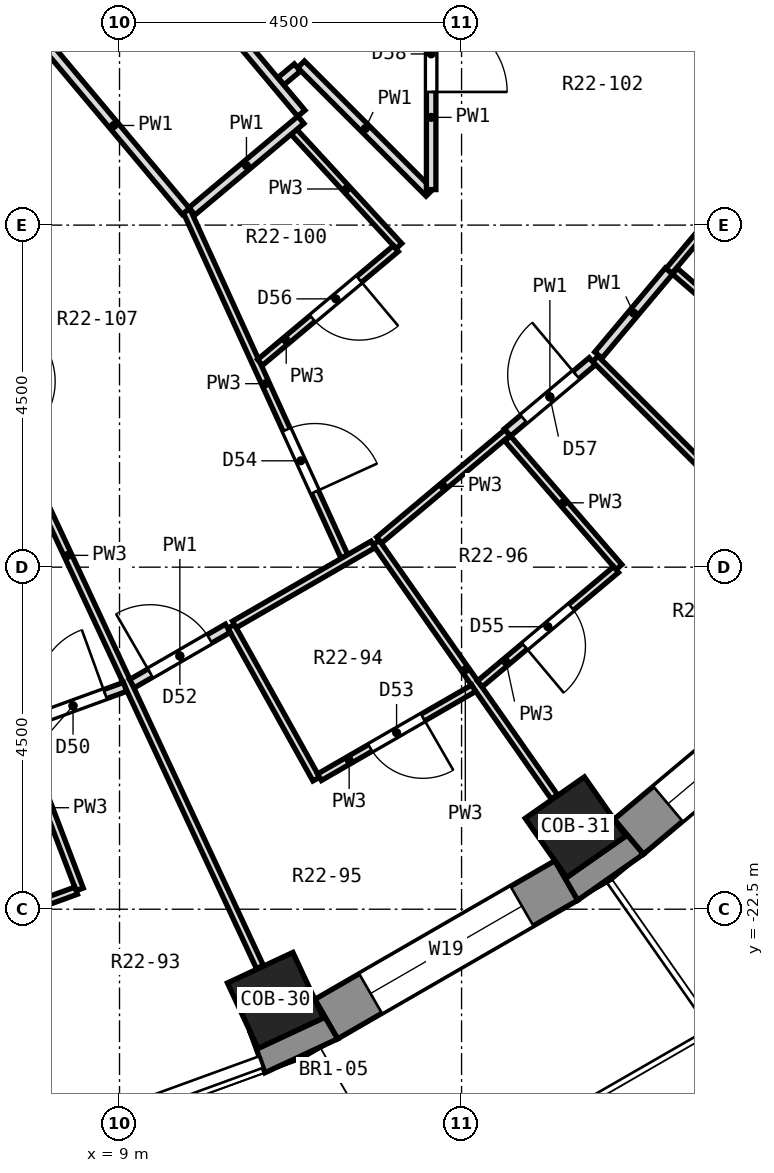
"""IFC4 building model, lengths in metres.
Left out: names, types, materials, properties, quantities, classifications, styles, units other than length and angle.
Written with IfcOpenShell. Run it as: python <this file> out.ifc"""

import sys

from ifc_helpers import new_model, si_unit, direction, frame, frame_2d, origin, origin_2d, place, context, subcontext, project, spatial, polyline, rectangle, outline, extrude, element, fill, save


model = new_model("IFC4")
c1 = context("Model", 3, precision=1e-05, world=origin(), true_north=direction((0.0, 1.0)))
c2 = subcontext(c1, "Body", "Model", "MODEL_VIEW")
j1 = project(units=[si_unit("LENGTHUNIT", "METRE"), si_unit("PLANEANGLEUNIT", "RADIAN")], contexts=[c1])
p1 = place(None, origin())
s1 = spatial("IfcSite", under=j1, at=p1, CompositionType="ELEMENT")
p2 = place(p1, origin())
s2 = spatial("IfcBuilding", under=s1, at=p2, CompositionType="ELEMENT")
p3 = place(p2, frame((0.0, 0.0, 141.4)))
s3 = spatial("IfcBuildingStorey", under=s2, at=p3, CompositionType="ELEMENT", Elevation=141.4)
for number, where, z_axis, x_axis in (
    (1, (11.052, -23.7, 0.0), (0.0, 0.0, 1.0), (0.423, -0.906, 0.0)),
    (2, (14.999, -21.421, 0.0), (0.0, 0.0, 1.0), (0.574, -0.819, 0.0)),
):
    element("IfcColumn", number, at=place(p3, frame(where, z_axis=z_axis, x_axis=x_axis)), inside=s3, PredefinedType="COLUMN", context=c2, shape_type="SweptSolid", body=[
        extrude(rectangle(XDim=0.95, YDim=0.95, at=origin_2d()), origin(), (0.0, 0.0, 1.0), 3.3),
    ])
p4 = place(p3, frame((11.719, -23.946, 0.0), z_axis=(0.0, 0.0, 1.0), x_axis=(0.866051847062, 0.499954196102, 0.0)))
e3 = element("IfcWall", 3, at=p4, inside=s3, PredefinedType="SOLIDWALL", context=c2, shape_type="SweptSolid", body=[
    extrude(rectangle(XDim=3.648, YDim=0.6, at=frame_2d((1.824, 0.0))), origin(), (0.0, 0.0, 1.0), 2.8),
])
p5 = place(p4, frame((0.674, 0.0, 0.9)))
e4 = element("IfcOpeningElement", 4, at=p5, cuts=e3, PredefinedType="OPENING", context=c2, shape_type="SweptSolid", body=[
    extrude(rectangle(XDim=2.3, YDim=1.8, at=frame_2d((1.15, 0.9))), frame((0.0, 0.312, 0.0), z_axis=(0.0, -1.0, 0.0), x_axis=(1.0, 0.0, 0.0)), (0.0, 0.0, 1.0), 0.624),
])
p6 = place(p3, frame((15.699, -21.547, 0.0), z_axis=(0.0, 0.0, 1.0), x_axis=(0.766055462616, 0.642774476932, 0.0)))
e5 = element("IfcWall", 5, at=p6, inside=s3, PredefinedType="SOLIDWALL", context=c2, shape_type="SweptSolid", body=[
    extrude(rectangle(XDim=3.648, YDim=0.6, at=frame_2d((1.824, 0.0))), origin(), (0.0, 0.0, 1.0), 2.8),
])
p7 = place(p6, frame((0.674, 0.0, 0.9)))
e6 = element("IfcOpeningElement", 6, at=p7, cuts=e5, PredefinedType="OPENING", context=c2, shape_type="SweptSolid", body=[
    extrude(rectangle(XDim=2.3, YDim=1.8, at=frame_2d((1.15, 0.9))), frame((0.0, 0.312, 0.0), z_axis=(0.0, -1.0, 0.0), x_axis=(1.0, 0.0, 0.0)), (0.0, 0.0, 1.0), 0.624),
])
p8 = place(p3, origin())
e7 = element("IfcWall", 7, at=p8, inside=s3, PredefinedType="SOLIDWALL", context=c2, shape_type="SweptSolid", body=[
    extrude(outline(polyline([(10.913, -24.651), (11.869, -24.206), (11.569, -23.686), (11.683, -23.93), (10.822, -24.331), (10.708, -24.087), (10.913, -24.651)])), origin(), (0.0, 0.0, 1.0), 2.8),
])
p9 = place(p3, origin())
e8 = element("IfcWall", 8, at=p9, inside=s3, PredefinedType="SOLIDWALL", context=c2, shape_type="SweptSolid", body=[
    extrude(outline(polyline([(15.892, -21.777), (15.506, -21.317), (15.661, -21.538), (14.882, -22.083), (14.728, -21.862), (15.028, -22.382), (15.892, -21.777)])), origin(), (0.0, 0.0, 1.0), 2.8),
])
p10 = place(p3, frame((7.657, -20.09, 0.0), z_axis=(0.0, 0.0, 1.0), x_axis=(0.35616749028, -0.934422130981, 0.0)))
e9 = element("IfcWall", 9, at=p10, inside=s3, PredefinedType="PARTITIONING", context=c2, shape_type="SweptSolid", body=[
    extrude(rectangle(XDim=2.3, YDim=0.1, at=frame_2d((1.15, 0.0))), origin(), (0.0, 0.0, 1.0), 2.8),
])
p11 = place(p3, frame((9.883, -13.312, 0.0), z_axis=(0.0, 0.0, 1.0), x_axis=(0.415273903312, -0.909696424764, 0.0)))
e10 = element("IfcWall", 10, at=p11, inside=s3, PredefinedType="PARTITIONING", context=c2, shape_type="SweptSolid", body=[
    extrude(rectangle(XDim=5.0, YDim=0.1, at=frame_2d((2.5, 0.0))), origin(), (0.0, 0.0, 1.0), 2.8),
])
p12 = place(p11, frame((3.166, 0.0, 0.0)))
e11 = element("IfcOpeningElement", 11, at=p12, cuts=e10, PredefinedType="OPENING", context=c2, shape_type="SweptSolid", body=[
    extrude(rectangle(XDim=0.9, YDim=2.1, at=frame_2d((0.45, 1.05))), frame((0.0, 0.062, 0.0), z_axis=(0.0, -1.0, 0.0), x_axis=(1.0, 0.0, 0.0)), (0.0, 0.0, 1.0), 0.124),
])
p13 = place(p3, frame((5.794, -12.43, 0.0), z_axis=(0.0, 0.0, 1.0), x_axis=(0.422795993745, -0.906224888023, 0.0)))
e12 = element("IfcWall", 12, at=p13, inside=s3, PredefinedType="PARTITIONING", context=c2, shape_type="SweptSolid", body=[
    extrude(rectangle(XDim=11.951, YDim=0.1, at=frame_2d((5.975, 0.0))), origin(), (0.0, 0.0, 1.0), 2.8),
])
p14 = place(p13, frame((3.451, 0.0, 0.0)))
e13 = element("IfcOpeningElement", 13, at=p14, cuts=e12, PredefinedType="OPENING", context=c2, shape_type="SweptSolid", body=[
    extrude(rectangle(XDim=0.9, YDim=2.1, at=frame_2d((0.45, 1.05))), frame((0.0, 0.062, 0.0), z_axis=(0.0, -1.0, 0.0), x_axis=(1.0, 0.0, 0.0)), (0.0, 0.0, 1.0), 0.124),
])
p15 = place(p3, frame((10.468, -18.779, 0.0), z_axis=(0.0, 0.0, 1.0), x_axis=(0.486886136125, -0.873465448915, 0.0)))
e14 = element("IfcWall", 14, at=p15, inside=s3, PredefinedType="PARTITIONING", context=c2, shape_type="SweptSolid", body=[
    extrude(rectangle(XDim=2.3, YDim=0.1, at=frame_2d((1.15, 0.0))), origin(), (0.0, 0.0, 1.0), 2.8),
])
p16 = place(p3, frame((12.377, -17.677, 0.0), z_axis=(0.0, 0.0, 1.0), x_axis=(0.573843281236, -0.818965132702, 0.0)))
e15 = element("IfcWall", 15, at=p16, inside=s3, PredefinedType="PARTITIONING", context=c2, shape_type="SweptSolid", body=[
    extrude(rectangle(XDim=4.086, YDim=0.1, at=frame_2d((2.043, 0.0))), origin(), (0.0, 0.0, 1.0), 2.8),
])
p17 = place(p3, frame((7.977, -11.059, 0.0), z_axis=(0.0, 0.0, 1.0), x_axis=(0.642679638204, -0.766135028985, 0.0)))
e16 = element("IfcWall", 16, at=p17, inside=s3, PredefinedType="PARTITIONING", context=c2, shape_type="SweptSolid", body=[
    extrude(rectangle(XDim=2.95, YDim=0.125, at=frame_2d((1.475, 0.0))), origin(), (0.0, 0.0, 1.0), 2.8),
])
p18 = place(p3, frame((8.22, -8.247, 0.0), z_axis=(0.0, 0.0, 1.0), x_axis=(0.642555132876, -0.766239454228, 0.0)))
e17 = element("IfcWall", 17, at=p18, inside=s3, PredefinedType="PARTITIONING", context=c2, shape_type="SweptSolid", body=[
    extrude(rectangle(XDim=4.937, YDim=0.125, at=frame_2d((2.468, 0.0))), origin(), (0.0, 0.0, 1.0), 2.8),
])
p19 = place(p3, frame((14.107, -16.307, 0.0), z_axis=(0.0, 0.0, 1.0), x_axis=(0.654423540777, -0.756128183099, 0.0)))
e18 = element("IfcWall", 18, at=p19, inside=s3, PredefinedType="PARTITIONING", context=c2, shape_type="SweptSolid", body=[
    extrude(rectangle(XDim=2.237, YDim=0.1, at=frame_2d((1.119, 0.0))), origin(), (0.0, 0.0, 1.0), 2.8),
])
p20 = place(p3, frame((11.295, -12.274, 0.0), z_axis=(0.0, 0.0, 1.0), x_axis=(0.676981317167, -0.736000201228, 0.0)))
e19 = element("IfcWall", 19, at=p20, inside=s3, PredefinedType="PARTITIONING", context=c2, shape_type="SweptSolid", body=[
    extrude(rectangle(XDim=2.039, YDim=0.1, at=frame_2d((1.02, 0.0))), origin(), (0.0, 0.0, 1.0), 2.8),
])
p21 = place(p3, frame((15.259, -15.259, 0.0), z_axis=(0.0, 0.0, 1.0), x_axis=(0.707106781187, -0.707106781187, 0.0)))
e20 = element("IfcWall", 20, at=p21, inside=s3, PredefinedType="PARTITIONING", context=c2, shape_type="SweptSolid", body=[
    extrude(rectangle(XDim=4.085, YDim=0.1, at=frame_2d((2.043, 0.0))), origin(), (0.0, 0.0, 1.0), 2.8),
])
p22 = place(p3, frame((11.388, -11.385, 0.0), z_axis=(0.0, 0.0, 1.0), x_axis=(0.707157874563, -0.707055684118, 0.0)))
e21 = element("IfcWall", 21, at=p22, inside=s3, PredefinedType="PARTITIONING", context=c2, shape_type="SweptSolid", body=[
    extrude(rectangle(XDim=2.389, YDim=0.125, at=frame_2d((1.195, 0.0))), origin(), (0.0, 0.0, 1.0), 2.8),
])
p23 = place(p3, frame((16.307, -14.107, 0.0), z_axis=(0.0, 0.0, 1.0), x_axis=(0.756128183099, -0.654423540777, 0.0)))
e22 = element("IfcWall", 22, at=p23, inside=s3, PredefinedType="PARTITIONING", context=c2, shape_type="SweptSolid", body=[
    extrude(rectangle(XDim=2.237, YDim=0.1, at=frame_2d((1.119, 0.0))), origin(), (0.0, 0.0, 1.0), 2.8),
])
p24 = place(p3, frame((6.242, -23.053, 0.0), z_axis=(0.0, 0.0, 1.0), x_axis=(0.939618756308, 0.342223016166, 0.0)))
e23 = element("IfcWall", 23, at=p24, inside=s3, PredefinedType="PARTITIONING", context=c2, shape_type="SweptSolid", body=[
    extrude(rectangle(XDim=2.328, YDim=0.1, at=frame_2d((1.164, 0.0))), origin(), (0.0, 0.0, 1.0), 2.8),
])
p25 = place(p24, frame((0.758, 0.0, 0.0)))
e24 = element("IfcOpeningElement", 24, at=p25, cuts=e23, PredefinedType="OPENING", context=c2, shape_type="SweptSolid", body=[
    extrude(rectangle(XDim=0.8, YDim=2.1, at=frame_2d((0.4, 1.05))), frame((0.0, 0.062, 0.0), z_axis=(0.0, -1.0, 0.0), x_axis=(1.0, 0.0, 0.0)), (0.0, 0.0, 1.0), 0.124),
])
p26 = place(p3, frame((7.704, -20.073, 0.0), z_axis=(0.0, 0.0, 1.0), x_axis=(0.939788529673, 0.341756520778, 0.0)))
e25 = element("IfcWall", 25, at=p26, inside=s3, PredefinedType="PARTITIONING", context=c2, shape_type="SweptSolid", body=[
    extrude(rectangle(XDim=1.457, YDim=0.125, at=frame_2d((0.728, 0.0))), origin(), (0.0, 0.0, 1.0), 2.8),
])
p27 = place(p26, frame((0.278, 0.0, 0.0)))
e26 = element("IfcOpeningElement", 26, at=p27, cuts=e25, PredefinedType="OPENING", context=c2, shape_type="SweptSolid", body=[
    extrude(rectangle(XDim=0.9, YDim=2.1, at=frame_2d((0.45, 1.05))), frame((0.0, 0.074, 0.0), z_axis=(0.0, -1.0, 0.0), x_axis=(1.0, 0.0, 0.0)), (0.0, 0.0, 1.0), 0.149),
])
p28 = place(p3, frame((11.631, -20.763, 0.0), z_axis=(0.0, 0.0, 1.0), x_axis=(0.866130014302, 0.499818765479, 0.0)))
e27 = element("IfcWall", 27, at=p28, inside=s3, PredefinedType="PARTITIONING", context=c2, shape_type="SweptSolid", body=[
    extrude(rectangle(XDim=2.341, YDim=0.1, at=frame_2d((1.17, 0.0))), origin(), (0.0, 0.0, 1.0), 2.8),
])
p29 = place(p28, frame((0.771, 0.0, 0.0)))
e28 = element("IfcOpeningElement", 28, at=p29, cuts=e27, PredefinedType="OPENING", context=c2, shape_type="SweptSolid", body=[
    extrude(rectangle(XDim=0.8, YDim=2.1, at=frame_2d((0.4, 1.05))), frame((0.0, 0.062, 0.0), z_axis=(0.0, -1.0, 0.0), x_axis=(1.0, 0.0, 0.0)), (0.0, 0.0, 1.0), 0.124),
])
p30 = place(p3, frame((10.511, -18.754, 0.0), z_axis=(0.0, 0.0, 1.0), x_axis=(0.866071606143, 0.499919966627, 0.0)))
e29 = element("IfcWall", 29, at=p30, inside=s3, PredefinedType="PARTITIONING", context=c2, shape_type="SweptSolid", body=[
    extrude(rectangle(XDim=2.104, YDim=0.1, at=frame_2d((1.052, 0.0))), origin(), (0.0, 0.0, 1.0), 2.8),
])
p31 = place(p3, frame((9.163, -19.533, 0.0), z_axis=(0.0, 0.0, 1.0), x_axis=(0.865819905352, 0.500355764928, 0.0)))
e30 = element("IfcWall", 30, at=p31, inside=s3, PredefinedType="PARTITIONING", context=c2, shape_type="SweptSolid", body=[
    extrude(rectangle(XDim=1.457, YDim=0.125, at=frame_2d((0.729, 0.0))), origin(), (0.0, 0.0, 1.0), 2.8),
])
p32 = place(p31, frame((0.279, 0.0, 0.0)))
e31 = element("IfcOpeningElement", 31, at=p32, cuts=e30, PredefinedType="OPENING", context=c2, shape_type="SweptSolid", body=[
    extrude(rectangle(XDim=0.9, YDim=2.1, at=frame_2d((0.45, 1.05))), frame((0.0, 0.074, 0.0), z_axis=(0.0, -1.0, 0.0), x_axis=(1.0, 0.0, 0.0)), (0.0, 0.0, 1.0), 0.149),
])
p33 = place(p3, frame((11.125, -11.606, 0.0), z_axis=(0.0, 0.0, 1.0), x_axis=(0.766857755144, 0.641817094955, 0.0)))
e32 = element("IfcWall", 32, at=p33, inside=s3, PredefinedType="PARTITIONING", context=c2, shape_type="SweptSolid", body=[
    extrude(rectangle(XDim=0.279, YDim=0.125, at=frame_2d((0.14, 0.0))), origin(), (0.0, 0.0, 1.0), 2.8),
])
p34 = place(p3, frame((13.74, -19.536, 0.0), z_axis=(0.0, 0.0, 1.0), x_axis=(0.765924716163, 0.642930267735, 0.0)))
e33 = element("IfcWall", 33, at=p34, inside=s3, PredefinedType="PARTITIONING", context=c2, shape_type="SweptSolid", body=[
    extrude(rectangle(XDim=2.34, YDim=0.1, at=frame_2d((1.17, 0.0))), origin(), (0.0, 0.0, 1.0), 2.8),
])
p35 = place(p34, frame((0.77, 0.0, 0.0)))
e34 = element("IfcOpeningElement", 34, at=p35, cuts=e33, PredefinedType="OPENING", context=c2, shape_type="SweptSolid", body=[
    extrude(rectangle(XDim=0.8, YDim=2.1, at=frame_2d((0.4, 1.05))), frame((0.0, 0.062, 0.0), z_axis=(0.0, -1.0, 0.0), x_axis=(1.0, 0.0, 0.0)), (0.0, 0.0, 1.0), 0.124),
])
p36 = place(p3, frame((12.415, -17.645, 0.0), z_axis=(0.0, 0.0, 1.0), x_axis=(0.766093039246, 0.642729690631, 0.0)))
e35 = element("IfcWall", 35, at=p36, inside=s3, PredefinedType="PARTITIONING", context=c2, shape_type="SweptSolid", body=[
    extrude(rectangle(XDim=2.205, YDim=0.1, at=frame_2d((1.102, 0.0))), origin(), (0.0, 0.0, 1.0), 2.8),
])
p37 = place(p3, frame((14.104, -16.228, 0.0), z_axis=(0.0, 0.0, 1.0), x_axis=(0.766114305984, 0.642704341177, 0.0)))
e36 = element("IfcWall", 36, at=p37, inside=s3, PredefinedType="PARTITIONING", context=c2, shape_type="SweptSolid", body=[
    extrude(rectangle(XDim=1.456, YDim=0.125, at=frame_2d((0.728, 0.0))), origin(), (0.0, 0.0, 1.0), 2.8),
])
p38 = place(p37, frame((0.278, 0.0, 0.0)))
e37 = element("IfcOpeningElement", 37, at=p38, cuts=e36, PredefinedType="OPENING", context=c2, shape_type="SweptSolid", body=[
    extrude(rectangle(XDim=0.9, YDim=2.1, at=frame_2d((0.45, 1.05))), frame((0.0, 0.074, 0.0), z_axis=(0.0, -1.0, 0.0), x_axis=(1.0, 0.0, 0.0)), (0.0, 0.0, 1.0), 0.149),
])
p39 = place(p3, frame((10.848, -15.307, 0.0), z_axis=(0.0, 0.0, 1.0), x_axis=(0.766356114298, 0.642415991456, 0.0)))
e38 = element("IfcWall", 38, at=p39, inside=s3, PredefinedType="PARTITIONING", context=c2, shape_type="SweptSolid", body=[
    extrude(rectangle(XDim=2.332, YDim=0.1, at=frame_2d((1.166, 0.0))), origin(), (0.0, 0.0, 1.0), 2.8),
])
p40 = place(p39, frame((0.902, 0.0, 0.0)))
e39 = element("IfcOpeningElement", 39, at=p40, cuts=e38, PredefinedType="OPENING", context=c2, shape_type="SweptSolid", body=[
    extrude(rectangle(XDim=0.8, YDim=2.1, at=frame_2d((0.4, 1.05))), frame((0.0, 0.062, 0.0), z_axis=(0.0, -1.0, 0.0), x_axis=(1.0, 0.0, 0.0)), (0.0, 0.0, 1.0), 0.124),
])
p41 = place(p3, frame((9.954, -13.317, 0.0), z_axis=(0.0, 0.0, 1.0), x_axis=(0.766162509907, 0.642646876919, 0.0)))
e40 = element("IfcWall", 40, at=p41, inside=s3, PredefinedType="PARTITIONING", context=c2, shape_type="SweptSolid", body=[
    extrude(rectangle(XDim=1.87, YDim=0.125, at=frame_2d((0.935, 0.0))), origin(), (0.0, 0.0, 1.0), 2.8),
])
p42 = place(p3, frame((16.228, -14.104, 0.0), z_axis=(0.0, 0.0, 1.0), x_axis=(0.642710935311, 0.766108774021, 0.0)))
e41 = element("IfcWall", 41, at=p42, inside=s3, PredefinedType="PARTITIONING", context=c2, shape_type="SweptSolid", body=[
    extrude(rectangle(XDim=2.202, YDim=0.1, at=frame_2d((1.101, 0.0))), origin(), (0.0, 0.0, 1.0), 2.8),
])
p43 = place(p3, frame((15.3, -15.21, 0.0), z_axis=(0.0, 0.0, 1.0), x_axis=(0.642676314535, 0.766137817064, 0.0)))
e42 = element("IfcWall", 42, at=p43, inside=s3, PredefinedType="PARTITIONING", context=c2, shape_type="SweptSolid", body=[
    extrude(rectangle(XDim=1.444, YDim=0.125, at=frame_2d((0.722, 0.0))), origin(), (0.0, 0.0, 1.0), 2.8),
])
p44 = place(p3, frame((13.1, -13.032, 0.0), z_axis=(0.0, 0.0, 1.0), x_axis=(0.0, 1.0, 0.0)))
e43 = element("IfcWall", 43, at=p44, inside=s3, PredefinedType="PARTITIONING", context=c2, shape_type="SweptSolid", body=[
    extrude(rectangle(XDim=3.632, YDim=0.125, at=frame_2d((1.816, 0.0))), origin(), (0.0, 0.0, 1.0), 2.8),
])
p45 = place(p44, frame((1.284, 0.0, 0.0)))
e44 = element("IfcOpeningElement", 44, at=p45, cuts=e43, PredefinedType="OPENING", context=c2, shape_type="SweptSolid", body=[
    extrude(rectangle(XDim=1.0, YDim=2.1, at=frame_2d((0.5, 1.05))), frame((0.0, 0.074, 0.0), z_axis=(0.0, -1.0, 0.0), x_axis=(1.0, 0.0, 0.0)), (0.0, 0.0, 1.0), 0.149),
])
p46 = place(p44, frame((2.435, 0.0, 0.0)))
e45 = element("IfcOpeningElement", 45, at=p46, cuts=e43, PredefinedType="OPENING", context=c2, shape_type="SweptSolid", body=[
    extrude(rectangle(XDim=0.9, YDim=2.1, at=frame_2d((0.45, 1.05))), frame((0.0, 0.074, 0.0), z_axis=(0.0, -1.0, 0.0), x_axis=(1.0, 0.0, 0.0)), (0.0, 0.0, 1.0), 0.149),
])
p47 = place(p5, origin())
e46 = element("IfcWindow", 46, at=p47, inside=s3, PartitioningType="SINGLE_PANEL", PredefinedType="WINDOW", context=c2, shape_type="SweptSolid", body=[
    extrude(rectangle(XDim=2.3, YDim=1.8, at=frame_2d((1.15, 0.9))), frame((0.0, 0.18, 0.0), z_axis=(0.0, -1.0, 0.0), x_axis=(1.0, 0.0, 0.0)), (0.0, 0.0, 1.0), 0.06),
])
fill(e4, e46)
p48 = place(p7, origin())
e47 = element("IfcWindow", 47, at=p48, inside=s3, PartitioningType="SINGLE_PANEL", PredefinedType="WINDOW", context=c2, shape_type="SweptSolid", body=[
    extrude(rectangle(XDim=2.3, YDim=1.8, at=frame_2d((1.15, 0.9))), frame((0.0, 0.18, 0.0), z_axis=(0.0, -1.0, 0.0), x_axis=(1.0, 0.0, 0.0)), (0.0, 0.0, 1.0), 0.06),
])
fill(e6, e47)
p49 = place(p27, origin())
e48 = element("IfcDoor", 48, at=p49, inside=s3, OperationType="SINGLE_SWING_RIGHT", PredefinedType="DOOR", context=c2, shape_type="SweptSolid", body=[
    extrude(rectangle(XDim=0.9, YDim=2.1, at=frame_2d((0.45, 1.05))), frame((0.0, 0.025, 0.0), z_axis=(0.0, -1.0, 0.0), x_axis=(1.0, 0.0, 0.0)), (0.0, 0.0, 1.0), 0.05),
])
fill(e26, e48)
p50 = place(p32, origin())
e49 = element("IfcDoor", 49, at=p50, inside=s3, OperationType="SINGLE_SWING_LEFT", PredefinedType="DOOR", context=c2, shape_type="SweptSolid", body=[
    extrude(rectangle(XDim=0.9, YDim=2.1, at=frame_2d((0.45, 1.05))), frame((0.0, 0.025, 0.0), z_axis=(0.0, -1.0, 0.0), x_axis=(1.0, 0.0, 0.0)), (0.0, 0.0, 1.0), 0.05),
])
fill(e31, e49)
p51 = place(p29, frame((0.8, 0.0, 0.0), z_axis=(0.0, 0.0, 1.0), x_axis=(-1.0, 0.0, 0.0)))
e50 = element("IfcDoor", 50, at=p51, inside=s3, OperationType="SINGLE_SWING_LEFT", PredefinedType="DOOR", context=c2, shape_type="SweptSolid", body=[
    extrude(rectangle(XDim=0.8, YDim=2.1, at=frame_2d((0.4, 1.05))), frame((0.0, 0.025, 0.0), z_axis=(0.0, -1.0, 0.0), x_axis=(1.0, 0.0, 0.0)), (0.0, 0.0, 1.0), 0.05),
])
fill(e28, e50)
p52 = place(p12, origin())
e51 = element("IfcDoor", 51, at=p52, inside=s3, OperationType="SINGLE_SWING_RIGHT", PredefinedType="DOOR", context=c2, shape_type="SweptSolid", body=[
    extrude(rectangle(XDim=0.9, YDim=2.1, at=frame_2d((0.45, 1.05))), frame((0.0, 0.025, 0.0), z_axis=(0.0, -1.0, 0.0), x_axis=(1.0, 0.0, 0.0)), (0.0, 0.0, 1.0), 0.05),
])
fill(e11, e51)
p53 = place(p35, frame((0.8, 0.0, 0.0), z_axis=(0.0, 0.0, 1.0), x_axis=(-1.0, 0.0, 0.0)))
e52 = element("IfcDoor", 52, at=p53, inside=s3, OperationType="SINGLE_SWING_RIGHT", PredefinedType="DOOR", context=c2, shape_type="SweptSolid", body=[
    extrude(rectangle(XDim=0.8, YDim=2.1, at=frame_2d((0.4, 1.05))), frame((0.0, 0.025, 0.0), z_axis=(0.0, -1.0, 0.0), x_axis=(1.0, 0.0, 0.0)), (0.0, 0.0, 1.0), 0.05),
])
fill(e34, e52)
p54 = place(p40, frame((0.8, 0.0, 0.0), z_axis=(0.0, 0.0, 1.0), x_axis=(-1.0, 0.0, 0.0)))
e53 = element("IfcDoor", 53, at=p54, inside=s3, OperationType="SINGLE_SWING_LEFT", PredefinedType="DOOR", context=c2, shape_type="SweptSolid", body=[
    extrude(rectangle(XDim=0.8, YDim=2.1, at=frame_2d((0.4, 1.05))), frame((0.0, 0.025, 0.0), z_axis=(0.0, -1.0, 0.0), x_axis=(1.0, 0.0, 0.0)), (0.0, 0.0, 1.0), 0.05),
])
fill(e39, e53)
p55 = place(p38, origin())
e54 = element("IfcDoor", 54, at=p55, inside=s3, OperationType="SINGLE_SWING_RIGHT", PredefinedType="DOOR", context=c2, shape_type="SweptSolid", body=[
    extrude(rectangle(XDim=0.9, YDim=2.1, at=frame_2d((0.45, 1.05))), frame((0.0, 0.025, 0.0), z_axis=(0.0, -1.0, 0.0), x_axis=(1.0, 0.0, 0.0)), (0.0, 0.0, 1.0), 0.05),
])
fill(e37, e54)
p56 = place(p45, frame((1.0, 0.0, 0.0), z_axis=(0.0, 0.0, 1.0), x_axis=(-1.0, 0.0, 0.0)))
e55 = element("IfcDoor", 55, at=p56, inside=s3, OperationType="SINGLE_SWING_RIGHT", PredefinedType="DOOR", context=c2, shape_type="SweptSolid", body=[
    extrude(rectangle(XDim=1.0, YDim=2.1, at=frame_2d((0.5, 1.05))), frame((0.0, 0.025, 0.0), z_axis=(0.0, -1.0, 0.0), x_axis=(1.0, 0.0, 0.0)), (0.0, 0.0, 1.0), 0.05),
])
fill(e44, e55)
save(model, sys.argv[1])
